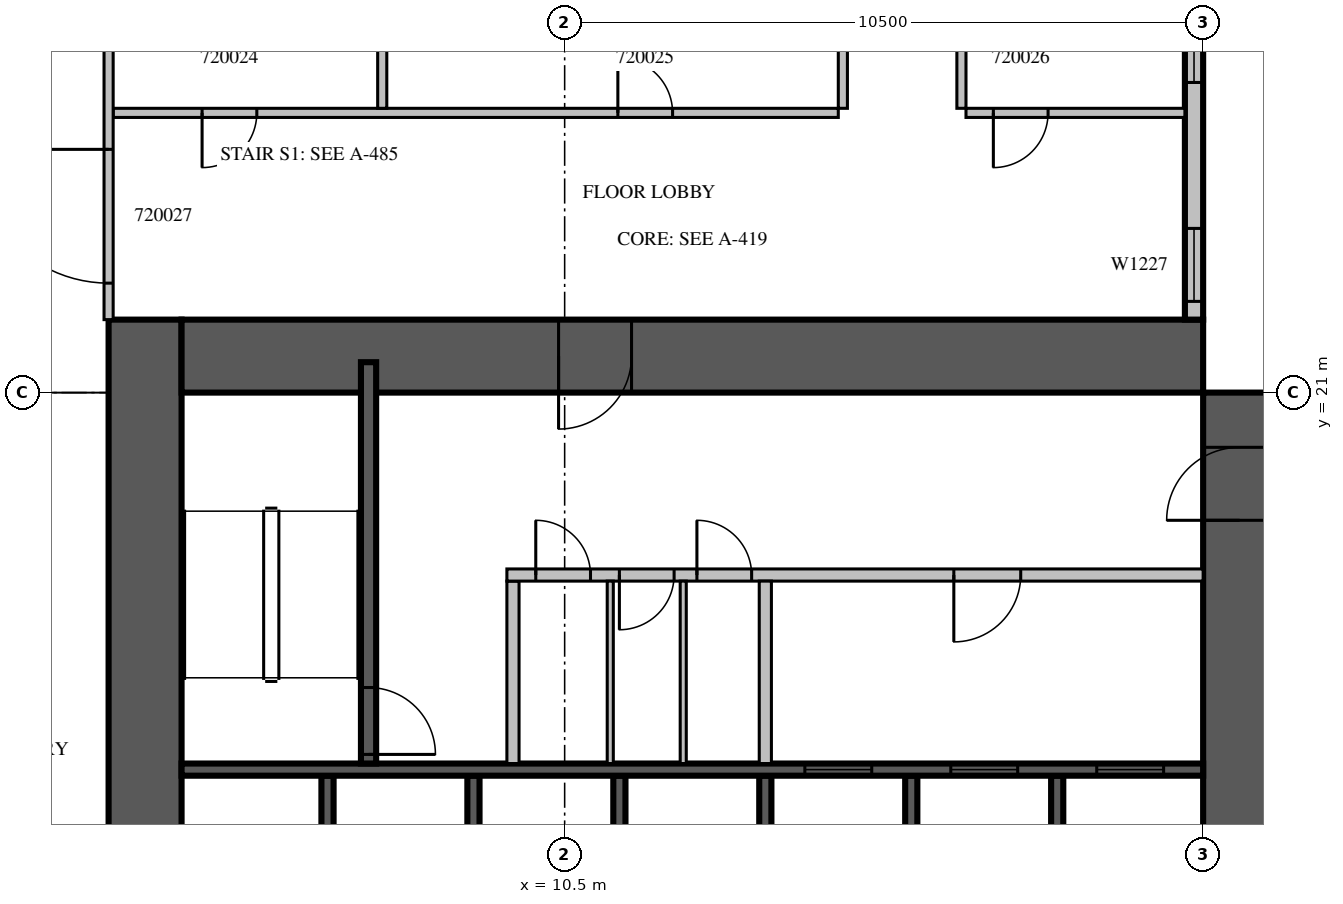
"""IFC4 building model, lengths in metres.
Left out: names, types, materials, properties, quantities, classifications, styles, units other than length and angle.
Written with IfcOpenShell. Run it as: python <this file> out.ifc"""

import sys

from ifc_helpers import new_model, si_unit, direction, frame, frame_2d, origin, place, context, subcontext, project, spatial, rectangle, extrude, source, transform, mapped, element, fill, save


model = new_model("IFC4")
c1 = context("Model", 3, precision=1e-05, world=origin(), true_north=direction((0.0, 1.0)))
c2 = subcontext(c1, "Body", "Model", "MODEL_VIEW")
j1 = project(units=[si_unit("LENGTHUNIT", "METRE"), si_unit("PLANEANGLEUNIT", "RADIAN")], contexts=[c1])
p1 = place(None, origin())
s1 = spatial("IfcSite", under=j1, at=p1, CompositionType="ELEMENT")
p2 = place(p1, origin())
s2 = spatial("IfcBuilding", under=s1, at=p2, CompositionType="ELEMENT")
p3 = place(p2, frame((0.0, 0.0, 95.1)))
s3 = spatial("IfcBuildingStorey", under=s2, at=p3, CompositionType="ELEMENT", Elevation=95.1)
m1 = source(origin(), c2, "Body", "SweptSolid", [
    extrude(rectangle(XDim=18.0, YDim=1.2, at=frame_2d((9.0, 0.0))), origin(), (0.0, 0.0, 1.0), 4.2),
])
p4 = place(p3, frame((3.6, 4.2, 0.0), z_axis=(0.0, 0.0, 1.0), x_axis=(0.0, 1.0, 0.0)))
e1 = element("IfcWall", 1, at=p4, inside=s3, PredefinedType="SHEAR", context=c2, shape_type="MappedRepresentation", body=[
    mapped(m1, transform((0.0, 0.0, 0.0), scale=1.0)),
])
m2 = source(origin(), c2, "Body", "SweptSolid", [
    extrude(rectangle(XDim=2.2, YDim=2.1, at=frame_2d((1.1, 1.05))), frame((0.0, 0.61, 0.0), z_axis=(0.0, -1.0, 0.0), x_axis=(1.0, 0.0, 0.0)), (0.0, 0.0, 1.0), 1.22),
])
p5 = place(p4, frame((4.2, 0.0, 0.0)))
e2 = element("IfcOpeningElement", 2, at=p5, cuts=e1, PredefinedType="OPENING", context=c2, shape_type="MappedRepresentation", body=[
    mapped(m2, transform((0.0, 0.0, 0.0), scale=1.0)),
])
m3 = source(origin(), c2, "Body", "SweptSolid", [
    extrude(rectangle(XDim=16.8, YDim=1.2, at=frame_2d((8.4, 0.0))), origin(), (0.0, 0.0, 1.0), 4.2),
])
p6 = place(p3, frame((21.6, 4.2, 0.0), z_axis=(0.0, 0.0, 1.0), x_axis=(0.0, 1.0, 0.0)))
e3 = element("IfcWall", 3, at=p6, inside=s3, PredefinedType="SHEAR", context=c2, shape_type="MappedRepresentation", body=[
    mapped(m3, transform((0.0, 0.0, 0.0), scale=1.0)),
])
p7 = place(p6, frame((4.2, 0.0, 0.0)))
e4 = element("IfcOpeningElement", 4, at=p7, cuts=e3, PredefinedType="OPENING", context=c2, shape_type="MappedRepresentation", body=[
    mapped(m2, transform((0.0, 0.0, 0.0), scale=1.0)),
])
m4 = source(origin(), c2, "Body", "SweptSolid", [
    extrude(rectangle(XDim=1.2, YDim=2.1, at=frame_2d((0.6, 1.05))), frame((0.0, 0.61, 0.0), z_axis=(0.0, -1.0, 0.0), x_axis=(1.0, 0.0, 0.0)), (0.0, 0.0, 1.0), 1.22),
])
p8 = place(p6, frame((14.7, 0.0, 0.0)))
e5 = element("IfcOpeningElement", 5, at=p8, cuts=e3, PredefinedType="OPENING", context=c2, shape_type="MappedRepresentation", body=[
    mapped(m4, transform((0.0, 0.0, 0.0), scale=1.0)),
])
p9 = place(p3, frame((4.2, 21.6, 0.0), z_axis=(0.0, 0.0, 1.0), x_axis=(1.0, 0.0, 0.0)))
e6 = element("IfcWall", 6, at=p9, inside=s3, PredefinedType="SHEAR", context=c2, shape_type="MappedRepresentation", body=[
    mapped(m3, transform((0.0, 0.0, 0.0), scale=1.0)),
])
p10 = place(p9, frame((6.2, 0.0, 0.0)))
e7 = element("IfcOpeningElement", 7, at=p10, cuts=e6, PredefinedType="OPENING", context=c2, shape_type="MappedRepresentation", body=[
    mapped(m4, transform((0.0, 0.0, 0.0), scale=1.0)),
])
m5 = source(origin(), c2, "Body", "SweptSolid", [
    extrude(rectangle(XDim=6.6, YDim=0.3, at=frame_2d((3.3, 0.0))), origin(), (0.0, 0.0, 1.0), 3.8),
])
p11 = place(p3, frame((20.85, 22.2, 0.0), z_axis=(0.0, 0.0, 1.0), x_axis=(0.0, 1.0, 0.0)))
e8 = element("IfcWall", 8, at=p11, inside=s3, PredefinedType="STANDARD", context=c2, shape_type="MappedRepresentation", body=[
    mapped(m5, transform((0.0, 0.0, 0.0), scale=1.0)),
])
m6 = source(origin(), c2, "Body", "SweptSolid", [
    extrude(rectangle(XDim=1.2, YDim=2.7, at=frame_2d((0.6, 1.35))), frame((0.0, 0.16, 0.0), z_axis=(0.0, -1.0, 0.0), x_axis=(1.0, 0.0, 0.0)), (0.0, 0.0, 1.0), 0.32),
])
p12 = place(p11, frame((0.3, 0.0, 0.6)))
e9 = element("IfcOpeningElement", 9, at=p12, cuts=e8, PredefinedType="OPENING", context=c2, shape_type="MappedRepresentation", body=[
    mapped(m6, transform((0.0, 0.0, 0.0), scale=1.0)),
])
m7 = source(origin(), c2, "Body", "SweptSolid", [
    extrude(rectangle(XDim=2.4, YDim=2.7, at=frame_2d((1.2, 1.35))), frame((0.0, 0.16, 0.0), z_axis=(0.0, -1.0, 0.0), x_axis=(1.0, 0.0, 0.0)), (0.0, 0.0, 1.0), 0.32),
])
p13 = place(p11, frame((3.9, 0.0, 0.6)))
e10 = element("IfcOpeningElement", 10, at=p13, cuts=e8, PredefinedType="OPENING", context=c2, shape_type="MappedRepresentation", body=[
    mapped(m7, transform((0.0, 0.0, 0.0), scale=1.0)),
])
m8 = source(origin(), c2, "Body", "SweptSolid", [
    extrude(rectangle(XDim=3.0, YDim=0.2, at=frame_2d((1.5, 0.0))), origin(), (0.0, 0.0, 1.0), 4.2),
])
for number, where, z_axis, x_axis in (
    (11, (6.6, 11.7, 0.0), (0.0, 0.0, 1.0), (0.0, 1.0, 0.0)),
    (12, (9.0, 11.7, 0.0), (0.0, 0.0, 1.0), (0.0, 1.0, 0.0)),
    (13, (11.4, 11.7, 0.0), (0.0, 0.0, 1.0), (0.0, 1.0, 0.0)),
    (14, (13.8, 11.7, 0.0), (0.0, 0.0, 1.0), (0.0, 1.0, 0.0)),
    (15, (16.2, 11.7, 0.0), (0.0, 0.0, 1.0), (0.0, 1.0, 0.0)),
    (16, (18.6, 11.7, 0.0), (0.0, 0.0, 1.0), (0.0, 1.0, 0.0)),
):
    element("IfcWall", number, at=place(p3, frame(where, z_axis=z_axis, x_axis=x_axis)), inside=s3, PredefinedType="SOLIDWALL", context=c2, shape_type="MappedRepresentation", body=[
        mapped(m8, transform((0.0, 0.0, 0.0), scale=1.0)),
    ])
m9 = source(origin(), c2, "Body", "SweptSolid", [
    extrude(rectangle(XDim=16.8, YDim=0.2, at=frame_2d((8.4, 0.0))), origin(), (0.0, 0.0, 1.0), 4.2),
])
p14 = place(p3, frame((4.2, 14.8, 0.0), z_axis=(0.0, 0.0, 1.0), x_axis=(1.0, 0.0, 0.0)))
e17 = element("IfcWall", 17, at=p14, inside=s3, PredefinedType="SOLIDWALL", context=c2, shape_type="MappedRepresentation", body=[
    mapped(m9, transform((0.0, 0.0, 0.0), scale=1.0)),
])
m10 = source(origin(), c2, "Body", "SweptSolid", [
    extrude(rectangle(XDim=1.1, YDim=2.1, at=frame_2d((0.55, 1.05))), frame((0.0, 0.11, 0.0), z_axis=(0.0, -1.0, 0.0), x_axis=(1.0, 0.0, 0.0)), (0.0, 0.0, 1.0), 0.22),
])
p15 = place(p14, frame((10.25, 0.0, 0.0)))
e18 = element("IfcOpeningElement", 18, at=p15, cuts=e17, PredefinedType="OPENING", context=c2, shape_type="MappedRepresentation", body=[
    mapped(m10, transform((0.0, 0.0, 0.0), scale=1.0)),
])
p16 = place(p14, frame((12.65, 0.0, 0.0)))
e19 = element("IfcOpeningElement", 19, at=p16, cuts=e17, PredefinedType="OPENING", context=c2, shape_type="MappedRepresentation", body=[
    mapped(m10, transform((0.0, 0.0, 0.0), scale=1.0)),
])
p17 = place(p14, frame((15.05, 0.0, 0.0)))
e20 = element("IfcOpeningElement", 20, at=p17, cuts=e17, PredefinedType="OPENING", context=c2, shape_type="MappedRepresentation", body=[
    mapped(m10, transform((0.0, 0.0, 0.0), scale=1.0)),
])
m11 = source(origin(), c2, "Body", "SweptSolid", [
    extrude(rectangle(XDim=6.6, YDim=0.25, at=frame_2d((3.3, 0.0))), origin(), (0.0, 0.0, 1.0), 3.8),
])
p18 = place(p3, frame((7.275, 14.9, 0.0), z_axis=(0.0, 0.0, 1.0), x_axis=(0.0, 1.0, 0.0)))
e21 = element("IfcWall", 21, at=p18, inside=s3, PredefinedType="SOLIDWALL", context=c2, shape_type="MappedRepresentation", body=[
    mapped(m11, transform((0.0, 0.0, 0.0), scale=1.0)),
])
m12 = source(origin(), c2, "Body", "SweptSolid", [
    extrude(rectangle(XDim=1.1, YDim=2.1, at=frame_2d((0.55, 1.05))), frame((0.0, 0.135, 0.0), z_axis=(0.0, -1.0, 0.0), x_axis=(1.0, 0.0, 0.0)), (0.0, 0.0, 1.0), 0.27),
])
p19 = place(p18, frame((0.15, 0.0, 0.0)))
e22 = element("IfcOpeningElement", 22, at=p19, cuts=e21, PredefinedType="OPENING", context=c2, shape_type="MappedRepresentation", body=[
    mapped(m12, transform((0.0, 0.0, 0.0), scale=1.0)),
])
m13 = source(origin(), c2, "Body", "SweptSolid", [
    extrude(rectangle(XDim=3.0, YDim=0.2, at=frame_2d((1.5, 0.0))), origin(), (0.0, 0.0, 1.0), 3.8),
])
p20 = place(p3, frame((9.65, 14.9, 0.0), z_axis=(0.0, 0.0, 1.0), x_axis=(0.0, 1.0, 0.0)))
e23 = element("IfcWall", 23, at=p20, inside=s3, PredefinedType="PARTITIONING", context=c2, shape_type="MappedRepresentation", body=[
    mapped(m13, transform((0.0, 0.0, 0.0), scale=1.0)),
])
m14 = source(origin(), c2, "Body", "SweptSolid", [
    extrude(rectangle(XDim=11.45, YDim=0.2, at=frame_2d((5.725, 0.0))), origin(), (0.0, 0.0, 1.0), 3.8),
])
p21 = place(p3, frame((9.55, 18.0, 0.0), z_axis=(0.0, 0.0, 1.0), x_axis=(1.0, 0.0, 0.0)))
e24 = element("IfcWall", 24, at=p21, inside=s3, PredefinedType="PARTITIONING", context=c2, shape_type="MappedRepresentation", body=[
    mapped(m14, transform((0.0, 0.0, 0.0), scale=1.0)),
])
m15 = source(origin(), c2, "Body", "SweptSolid", [
    extrude(rectangle(XDim=0.9, YDim=2.1, at=frame_2d((0.45, 1.05))), frame((0.0, 0.11, 0.0), z_axis=(0.0, -1.0, 0.0), x_axis=(1.0, 0.0, 0.0)), (0.0, 0.0, 1.0), 0.22),
])
p22 = place(p21, frame((0.475, 0.0, 0.0)))
e25 = element("IfcOpeningElement", 25, at=p22, cuts=e24, PredefinedType="OPENING", context=c2, shape_type="MappedRepresentation", body=[
    mapped(m15, transform((0.0, 0.0, 0.0), scale=1.0)),
])
p23 = place(p21, frame((1.85, 0.0, 0.0)))
e26 = element("IfcOpeningElement", 26, at=p23, cuts=e24, PredefinedType="OPENING", context=c2, shape_type="MappedRepresentation", body=[
    mapped(m15, transform((0.0, 0.0, 0.0), scale=1.0)),
])
p24 = place(p21, frame((3.125, 0.0, 0.0)))
e27 = element("IfcOpeningElement", 27, at=p24, cuts=e24, PredefinedType="OPENING", context=c2, shape_type="MappedRepresentation", body=[
    mapped(m15, transform((0.0, 0.0, 0.0), scale=1.0)),
])
p25 = place(p21, frame((7.35, 0.0, 0.0)))
e28 = element("IfcOpeningElement", 28, at=p25, cuts=e24, PredefinedType="OPENING", context=c2, shape_type="MappedRepresentation", body=[
    mapped(m10, transform((0.0, 0.0, 0.0), scale=1.0)),
])
p26 = place(p3, frame((13.8, 14.9, 0.0), z_axis=(0.0, 0.0, 1.0), x_axis=(0.0, 1.0, 0.0)))
e29 = element("IfcWall", 29, at=p26, inside=s3, PredefinedType="PARTITIONING", context=c2, shape_type="MappedRepresentation", body=[
    mapped(m13, transform((0.0, 0.0, 0.0), scale=1.0)),
])
m16 = source(origin(), c2, "Body", "SweptSolid", [
    extrude(rectangle(XDim=3.0, YDim=0.1, at=frame_2d((1.5, 0.0))), origin(), (0.0, 0.0, 1.0), 3.8),
])
for number, where, z_axis, x_axis in (
    (30, (11.25, 14.9, 0.0), (0.0, 0.0, 1.0), (0.0, 1.0, 0.0)),
    (31, (12.45, 14.9, 0.0), (0.0, 0.0, 1.0), (0.0, 1.0, 0.0)),
):
    element("IfcWall", number, at=place(p3, frame(where, z_axis=z_axis, x_axis=x_axis)), inside=s3, PredefinedType="PARTITIONING", context=c2, shape_type="MappedRepresentation", body=[
        mapped(m16, transform((0.0, 0.0, 0.0), scale=1.0)),
    ])
m17 = source(origin(), c2, "Body", "SweptSolid", [
    extrude(rectangle(XDim=11.925, YDim=0.15, at=frame_2d((5.963, 0.0))), origin(), (0.0, 0.0, 1.0), 3.8),
])
p27 = place(p3, frame((3.075, 25.6, 0.0), z_axis=(0.0, 0.0, 1.0), x_axis=(1.0, 0.0, 0.0)))
e32 = element("IfcWall", 32, at=p27, inside=s3, PredefinedType="PARTITIONING", context=c2, shape_type="MappedRepresentation", body=[
    mapped(m17, transform((0.0, 0.0, 0.0), scale=1.0)),
])
m18 = source(origin(), c2, "Body", "SweptSolid", [
    extrude(rectangle(XDim=0.9, YDim=2.1, at=frame_2d((0.45, 1.05))), frame((0.0, 0.085, 0.0), z_axis=(0.0, -1.0, 0.0), x_axis=(1.0, 0.0, 0.0)), (0.0, 0.0, 1.0), 0.17),
])
p28 = place(p27, frame((1.462, 0.0, 0.0)))
e33 = element("IfcOpeningElement", 33, at=p28, cuts=e32, PredefinedType="OPENING", context=c2, shape_type="MappedRepresentation", body=[
    mapped(m18, transform((0.0, 0.0, 0.0), scale=1.0)),
])
p29 = place(p27, frame((8.3, 0.0, 0.0)))
e34 = element("IfcOpeningElement", 34, at=p29, cuts=e32, PredefinedType="OPENING", context=c2, shape_type="MappedRepresentation", body=[
    mapped(m18, transform((0.0, 0.0, 0.0), scale=1.0)),
])
m19 = source(origin(), c2, "Body", "SweptSolid", [
    extrude(rectangle(XDim=3.6, YDim=0.15, at=frame_2d((1.8, 0.0))), origin(), (0.0, 0.0, 1.0), 3.8),
])
p30 = place(p3, frame((17.1, 25.6, 0.0), z_axis=(0.0, 0.0, 1.0), x_axis=(1.0, 0.0, 0.0)))
e35 = element("IfcWall", 35, at=p30, inside=s3, PredefinedType="PARTITIONING", context=c2, shape_type="MappedRepresentation", body=[
    mapped(m19, transform((0.0, 0.0, 0.0), scale=1.0)),
])
p31 = place(p30, frame((0.45, 0.0, 0.0)))
e36 = element("IfcOpeningElement", 36, at=p31, cuts=e35, PredefinedType="OPENING", context=c2, shape_type="MappedRepresentation", body=[
    mapped(m18, transform((0.0, 0.0, 0.0), scale=1.0)),
])
m20 = source(origin(), c2, "Body", "SweptSolid", [
    extrude(rectangle(XDim=3.65, YDim=0.15, at=frame_2d((1.825, 0.0))), origin(), (0.0, 0.0, 1.0), 3.8),
])
for number, where, z_axis, x_axis in (
    (37, (7.5, 25.675, 0.0), (0.0, 0.0, 1.0), (0.0, 1.0, 0.0)),
    (38, (15.075, 25.675, 0.0), (0.0, 0.0, 1.0), (0.0, 1.0, 0.0)),
    (39, (17.025, 29.325, 0.0), (0.0, 0.0, 1.0), (0.0, -1.0, 0.0)),
):
    element("IfcWall", number, at=place(p3, frame(where, z_axis=z_axis, x_axis=x_axis)), inside=s3, PredefinedType="PARTITIONING", context=c2, shape_type="MappedRepresentation", body=[
        mapped(m20, transform((0.0, 0.0, 0.0), scale=1.0)),
    ])
m21 = source(origin(), c2, "Body", "SweptSolid", [
    extrude(rectangle(XDim=7.125, YDim=0.15, at=frame_2d((3.562, 0.0))), origin(), (0.0, 0.0, 1.0), 3.8),
])
p32 = place(p3, frame((3.0, 29.325, 0.0), z_axis=(0.0, 0.0, 1.0), x_axis=(0.0, -1.0, 0.0)))
e40 = element("IfcWall", 40, at=p32, inside=s3, PredefinedType="PARTITIONING", context=c2, shape_type="MappedRepresentation", body=[
    mapped(m21, transform((0.0, 0.0, 0.0), scale=1.0)),
])
m22 = source(origin(), c2, "Body", "SweptSolid", [
    extrude(rectangle(XDim=2.2, YDim=2.1, at=frame_2d((1.1, 1.05))), frame((0.0, 0.085, 0.0), z_axis=(0.0, -1.0, 0.0), x_axis=(1.0, 0.0, 0.0)), (0.0, 0.0, 1.0), 0.17),
])
p33 = place(p32, frame((4.325, 0.0, 0.0)))
e41 = element("IfcOpeningElement", 41, at=p33, cuts=e40, PredefinedType="OPENING", context=c2, shape_type="MappedRepresentation", body=[
    mapped(m22, transform((0.0, 0.0, 0.0), scale=1.0)),
])
m23 = source(origin(), c2, "Body", "SweptSolid", [
    extrude(rectangle(XDim=1.2, YDim=2.7, at=frame_2d((0.6, 1.35))), frame((0.0, 0.03, 0.0), z_axis=(0.0, -1.0, 0.0), x_axis=(1.0, 0.0, 0.0)), (0.0, 0.0, 1.0), 0.06),
])
p34 = place(p12, origin())
e42 = element("IfcWindow", 42, at=p34, inside=s3, PartitioningType="SINGLE_PANEL", PredefinedType="WINDOW", context=c2, shape_type="MappedRepresentation", body=[
    mapped(m23, transform((0.0, 0.0, 0.0), scale=1.0)),
])
fill(e9, e42)
m24 = source(origin(), c2, "Body", "SweptSolid", [
    extrude(rectangle(XDim=2.4, YDim=2.7, at=frame_2d((1.2, 1.35))), frame((0.0, 0.03, 0.0), z_axis=(0.0, -1.0, 0.0), x_axis=(1.0, 0.0, 0.0)), (0.0, 0.0, 1.0), 0.06),
])
p35 = place(p13, origin())
e43 = element("IfcWindow", 43, at=p35, inside=s3, PartitioningType="SINGLE_PANEL", PredefinedType="WINDOW", context=c2, shape_type="MappedRepresentation", body=[
    mapped(m24, transform((0.0, 0.0, 0.0), scale=1.0)),
])
fill(e10, e43)
m25 = source(origin(), c2, "Body", "SweptSolid", [
    extrude(rectangle(XDim=1.1, YDim=2.1, at=frame_2d((0.55, 1.05))), frame((0.0, 0.025, 0.0), z_axis=(0.0, -1.0, 0.0), x_axis=(1.0, 0.0, 0.0)), (0.0, 0.0, 1.0), 0.05),
])
p36 = place(p15, origin())
e44 = element("IfcDoor", 44, at=p36, inside=s3, OperationType="SLIDING_TO_LEFT", PredefinedType="DOOR", context=c2, shape_type="MappedRepresentation", body=[
    mapped(m25, transform((0.0, 0.0, 0.0), scale=1.0)),
])
fill(e18, e44)
p37 = place(p16, origin())
e45 = element("IfcDoor", 45, at=p37, inside=s3, OperationType="SLIDING_TO_LEFT", PredefinedType="DOOR", context=c2, shape_type="MappedRepresentation", body=[
    mapped(m25, transform((0.0, 0.0, 0.0), scale=1.0)),
])
fill(e19, e45)
p38 = place(p17, origin())
e46 = element("IfcDoor", 46, at=p38, inside=s3, OperationType="SLIDING_TO_LEFT", PredefinedType="DOOR", context=c2, shape_type="MappedRepresentation", body=[
    mapped(m25, transform((0.0, 0.0, 0.0), scale=1.0)),
])
fill(e20, e46)
p39 = place(p19, origin())
e47 = element("IfcDoor", 47, at=p39, inside=s3, OperationType="SINGLE_SWING_RIGHT", PredefinedType="DOOR", context=c2, shape_type="MappedRepresentation", body=[
    mapped(m25, transform((0.0, 0.0, 0.0), scale=1.0)),
])
fill(e22, e47)
m26 = source(origin(), c2, "Body", "SweptSolid", [
    extrude(rectangle(XDim=0.9, YDim=2.1, at=frame_2d((0.45, 1.05))), frame((0.0, 0.025, 0.0), z_axis=(0.0, -1.0, 0.0), x_axis=(1.0, 0.0, 0.0)), (0.0, 0.0, 1.0), 0.05),
])
p40 = place(p22, origin())
e48 = element("IfcDoor", 48, at=p40, inside=s3, OperationType="SINGLE_SWING_LEFT", PredefinedType="DOOR", context=c2, shape_type="MappedRepresentation", body=[
    mapped(m26, transform((0.0, 0.0, 0.0), scale=1.0)),
])
fill(e25, e48)
p41 = place(p23, origin())
e49 = element("IfcDoor", 49, at=p41, inside=s3, OperationType="SINGLE_SWING_RIGHT", PredefinedType="DOOR", context=c2, shape_type="MappedRepresentation", body=[
    mapped(m26, transform((0.0, 0.0, 0.0), scale=1.0)),
])
fill(e26, e49)
p42 = place(p24, origin())
e50 = element("IfcDoor", 50, at=p42, inside=s3, OperationType="SINGLE_SWING_LEFT", PredefinedType="DOOR", context=c2, shape_type="MappedRepresentation", body=[
    mapped(m26, transform((0.0, 0.0, 0.0), scale=1.0)),
])
fill(e27, e50)
p43 = place(p25, origin())
e51 = element("IfcDoor", 51, at=p43, inside=s3, OperationType="SINGLE_SWING_RIGHT", PredefinedType="DOOR", context=c2, shape_type="MappedRepresentation", body=[
    mapped(m25, transform((0.0, 0.0, 0.0), scale=1.0)),
])
fill(e28, e51)
m27 = source(origin(), c2, "Body", "SweptSolid", [
    extrude(rectangle(XDim=1.2, YDim=2.1, at=frame_2d((0.6, 1.05))), frame((0.0, 0.025, 0.0), z_axis=(0.0, -1.0, 0.0), x_axis=(1.0, 0.0, 0.0)), (0.0, 0.0, 1.0), 0.05),
])
p44 = place(p10, origin())
e52 = element("IfcDoor", 52, at=p44, inside=s3, OperationType="SINGLE_SWING_RIGHT", PredefinedType="DOOR", context=c2, shape_type="MappedRepresentation", body=[
    mapped(m27, transform((0.0, 0.0, 0.0), scale=1.0)),
])
fill(e7, e52)
p45 = place(p8, origin())
e53 = element("IfcDoor", 53, at=p45, inside=s3, OperationType="SINGLE_SWING_LEFT", PredefinedType="DOOR", context=c2, shape_type="MappedRepresentation", body=[
    mapped(m27, transform((0.0, 0.0, 0.0), scale=1.0)),
])
fill(e5, e53)
p46 = place(p28, origin())
e54 = element("IfcDoor", 54, at=p46, inside=s3, OperationType="SINGLE_SWING_RIGHT", PredefinedType="DOOR", context=c2, shape_type="MappedRepresentation", body=[
    mapped(m26, transform((0.0, 0.0, 0.0), scale=1.0)),
])
fill(e33, e54)
p47 = place(p29, origin())
e55 = element("IfcDoor", 55, at=p47, inside=s3, OperationType="SINGLE_SWING_LEFT", PredefinedType="DOOR", context=c2, shape_type="MappedRepresentation", body=[
    mapped(m26, transform((0.0, 0.0, 0.0), scale=1.0)),
])
fill(e34, e55)
p48 = place(p31, origin())
e56 = element("IfcDoor", 56, at=p48, inside=s3, OperationType="SINGLE_SWING_RIGHT", PredefinedType="DOOR", context=c2, shape_type="MappedRepresentation", body=[
    mapped(m26, transform((0.0, 0.0, 0.0), scale=1.0)),
])
fill(e36, e56)
m28 = source(origin(), c2, "Body", "SweptSolid", [
    extrude(rectangle(XDim=2.2, YDim=2.1, at=frame_2d((1.1, 1.05))), frame((0.0, 0.025, 0.0), z_axis=(0.0, -1.0, 0.0), x_axis=(1.0, 0.0, 0.0)), (0.0, 0.0, 1.0), 0.05),
])
p49 = place(p33, origin())
e57 = element("IfcDoor", 57, at=p49, inside=s3, OperationType="DOUBLE_DOOR_SINGLE_SWING", PredefinedType="DOOR", context=c2, shape_type="MappedRepresentation", body=[
    mapped(m28, transform((0.0, 0.0, 0.0), scale=1.0)),
])
fill(e41, e57)
save(model, sys.argv[1])
